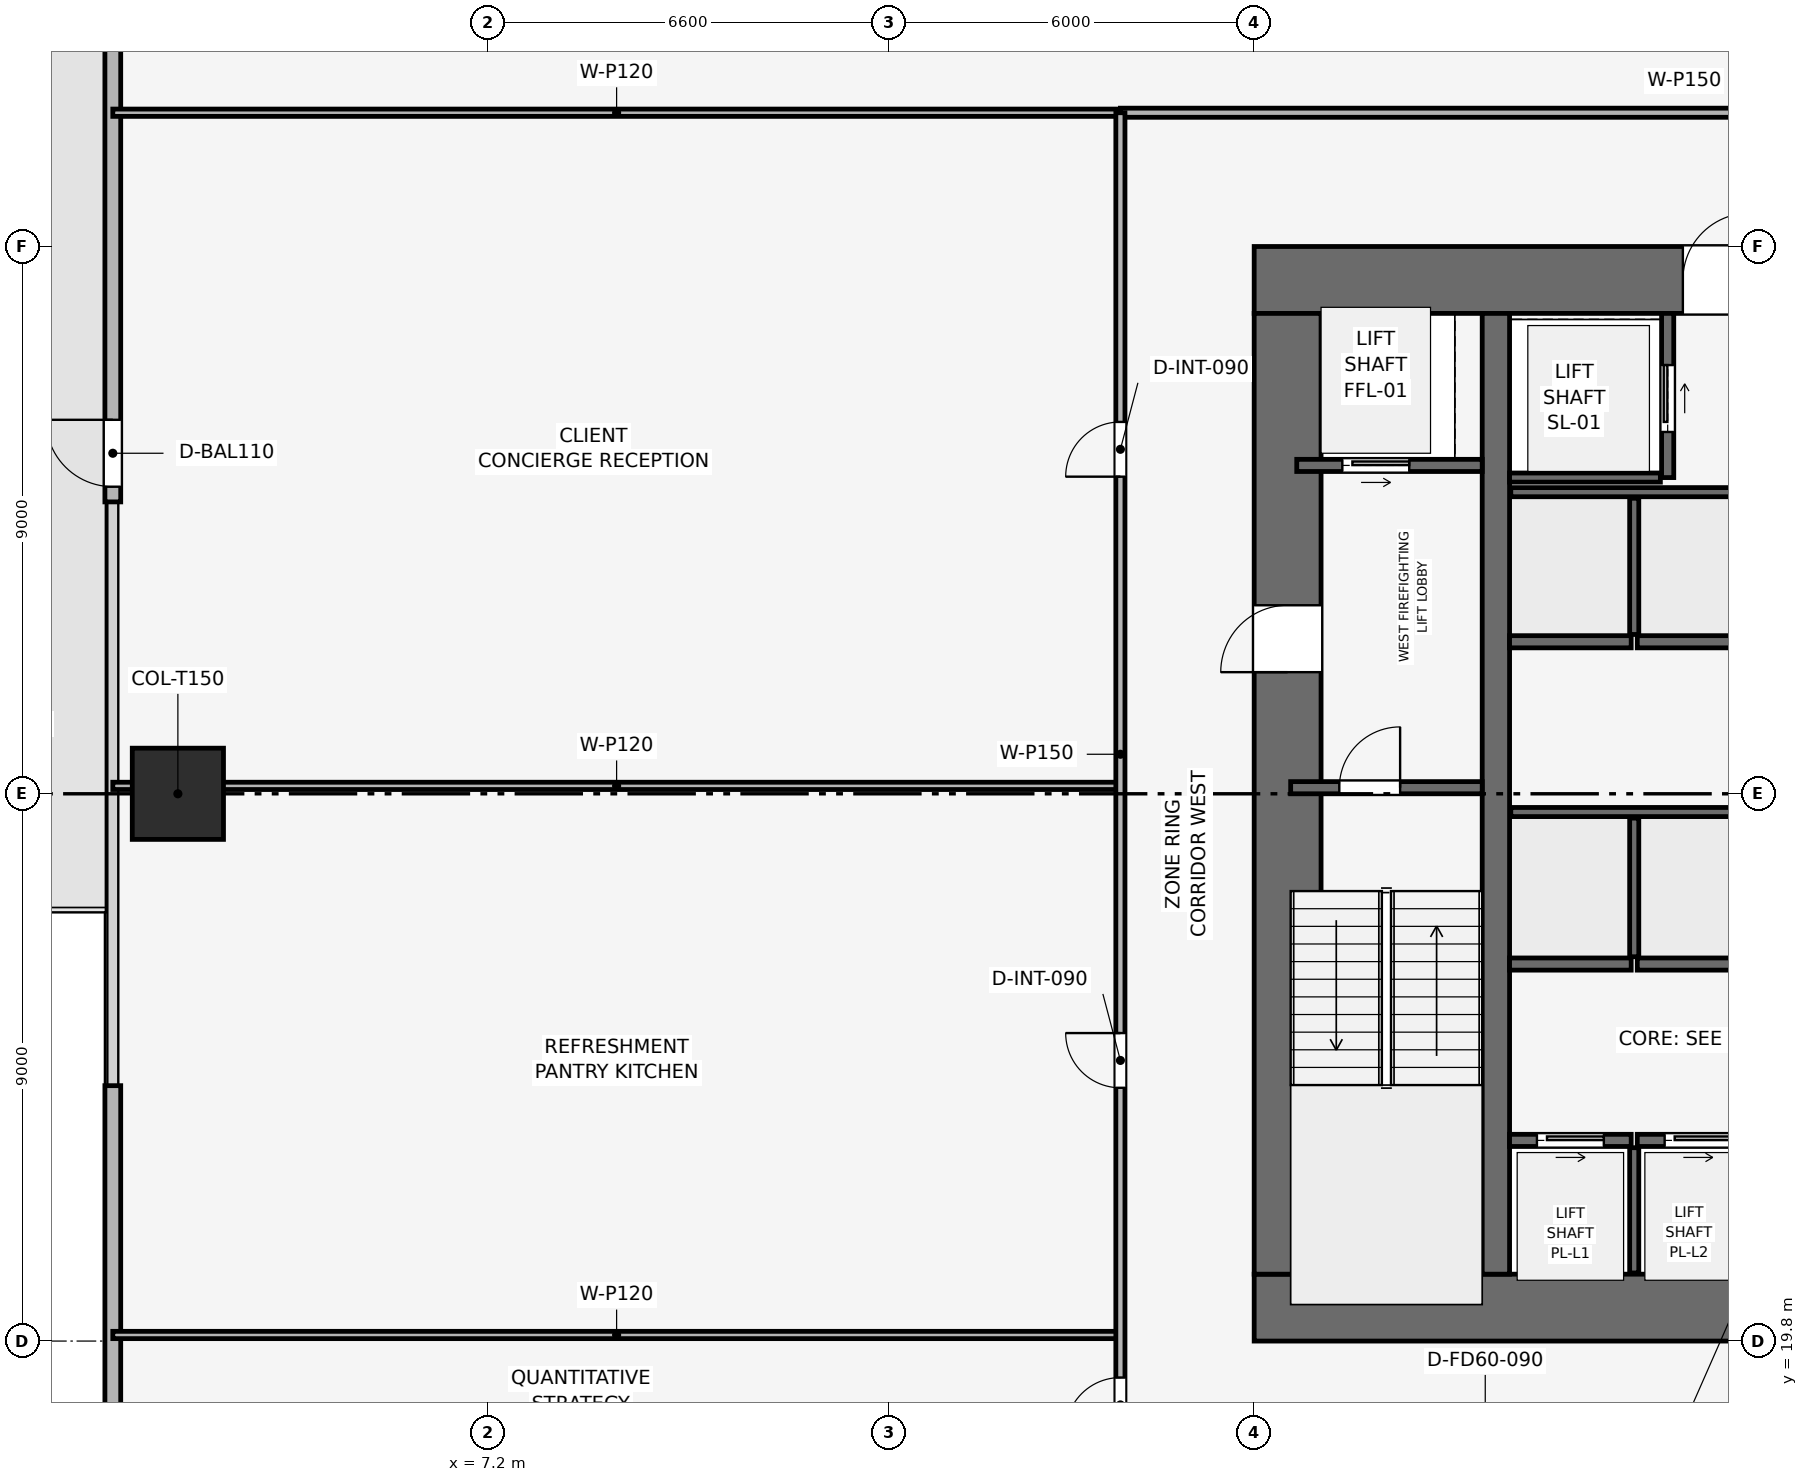
"""IFC4 building model, lengths in metres.
Left out: names, types, materials, properties, quantities, classifications, styles, units other than length and angle.
Written with IfcOpenShell. Run it as: python <this file> out.ifc"""

import sys

from ifc_helpers import new_model, si_unit, direction, frame, frame_2d, origin, origin_2d, place, context, subcontext, project, spatial, rectangle, extrude, element, fill, save


model = new_model("IFC4")
c1 = context("Model", 3, precision=1e-05, world=origin(), true_north=direction((0.0, 1.0)))
c2 = subcontext(c1, "Body", "Model", "MODEL_VIEW")
j1 = project(units=[si_unit("LENGTHUNIT", "METRE"), si_unit("PLANEANGLEUNIT", "RADIAN")], contexts=[c1])
p1 = place(None, origin())
s1 = spatial("IfcSite", under=j1, at=p1, CompositionType="ELEMENT")
p2 = place(p1, origin())
s2 = spatial("IfcBuilding", under=s1, at=p2, CompositionType="ELEMENT")
p3 = place(p2, frame((0.0, 0.0, 65.1)))
s3 = spatial("IfcBuildingStorey", under=s2, at=p3, CompositionType="ELEMENT", Elevation=65.1)
p4 = place(p3, frame((19.8, 20.35, 0.0), z_axis=(0.0, 0.0, 1.0), x_axis=(1.0, 0.0, 0.0)))
e1 = element("IfcWall", 1, at=p4, inside=s3, PredefinedType="SHEAR", context=c2, shape_type="SweptSolid", body=[
    extrude(rectangle(XDim=18.0, YDim=1.1, at=frame_2d((9.0, 0.0))), origin(), (0.0, 0.0, 1.0), 3.9),
])
p5 = place(p4, frame((8.4, 0.0, 0.0)))
e2 = element("IfcOpeningElement", 2, at=p5, cuts=e1, PredefinedType="OPENING", context=c2, shape_type="SweptSolid", body=[
    extrude(rectangle(XDim=1.2, YDim=2.2, at=frame_2d((0.6, 1.1))), frame((0.0, 0.56, 0.0), z_axis=(0.0, -1.0, 0.0), x_axis=(1.0, 0.0, 0.0)), (0.0, 0.0, 1.0), 1.12),
])
p6 = place(p3, frame((19.8, 37.25, 0.0), z_axis=(0.0, 0.0, 1.0), x_axis=(1.0, 0.0, 0.0)))
e3 = element("IfcWall", 3, at=p6, inside=s3, PredefinedType="SHEAR", context=c2, shape_type="SweptSolid", body=[
    extrude(rectangle(XDim=18.0, YDim=1.1, at=frame_2d((9.0, 0.0))), origin(), (0.0, 0.0, 1.0), 3.9),
])
p7 = place(p6, frame((7.05, 0.0, 0.0)))
e4 = element("IfcOpeningElement", 4, at=p7, cuts=e3, PredefinedType="OPENING", context=c2, shape_type="SweptSolid", body=[
    extrude(rectangle(XDim=1.1, YDim=2.15, at=frame_2d((0.55, 1.075))), frame((0.0, 0.56, 0.0), z_axis=(0.0, -1.0, 0.0), x_axis=(1.0, 0.0, 0.0)), (0.0, 0.0, 1.0), 1.12),
])
p8 = place(p3, frame((20.35, 20.9, 0.0), z_axis=(0.0, 0.0, 1.0), x_axis=(0.0, 1.0, 0.0)))
e5 = element("IfcWall", 5, at=p8, inside=s3, PredefinedType="SHEAR", context=c2, shape_type="SweptSolid", body=[
    extrude(rectangle(XDim=15.8, YDim=1.1, at=frame_2d((7.9, 0.0))), origin(), (0.0, 0.0, 1.0), 3.9),
])
p9 = place(p8, frame((9.9, 0.0, 0.0)))
e6 = element("IfcOpeningElement", 6, at=p9, cuts=e5, PredefinedType="OPENING", context=c2, shape_type="SweptSolid", body=[
    extrude(rectangle(XDim=1.1, YDim=2.15, at=frame_2d((0.55, 1.075))), frame((0.0, 0.56, 0.0), z_axis=(0.0, -1.0, 0.0), x_axis=(1.0, 0.0, 0.0)), (0.0, 0.0, 1.0), 1.12),
])
p10 = place(p3, frame((23.775, 20.9, 0.0), z_axis=(0.0, 0.0, 1.0), x_axis=(0.0, 1.0, 0.0)))
e7 = element("IfcWall", 7, at=p10, inside=s3, PredefinedType="SHEAR", context=c2, shape_type="SweptSolid", body=[
    extrude(rectangle(XDim=15.8, YDim=0.45, at=frame_2d((7.9, 0.0))), origin(), (0.0, 0.0, 1.0), 3.9),
])
p11 = place(p3, frame((2.1, 28.8, 0.003), z_axis=(0.0, 0.0, 1.0), x_axis=(1.0, 0.0, 0.0)))
e8 = element("IfcColumn", 8, at=p11, inside=s3, PredefinedType="COLUMN", context=c2, shape_type="SweptSolid", body=[
    extrude(rectangle(XDim=1.5, YDim=1.5, at=origin_2d()), origin(), (0.0, 0.0, 1.0), 3.644),
])
p12 = place(p3, frame((1.03, 8.7, 0.0), z_axis=(0.0, 0.0, 1.0), x_axis=(0.0, 1.0, 0.0)))
e9 = element("IfcWall", 9, at=p12, inside=s3, PredefinedType="SOLIDWALL", context=c2, shape_type="SweptSolid", body=[
    extrude(rectangle(XDim=15.3, YDim=0.26, at=frame_2d((7.65, 0.0))), origin(), (0.0, 0.0, 1.0), 3.65),
])
p13 = place(p12, frame((0.25, 0.0, 0.9)))
e10 = element("IfcOpeningElement", 10, at=p13, cuts=e9, PredefinedType="OPENING", context=c2, shape_type="SweptSolid", body=[
    extrude(rectangle(XDim=3.8, YDim=1.9, at=frame_2d((1.9, 0.95))), frame((0.0, 0.14, 0.0), z_axis=(0.0, -1.0, 0.0), x_axis=(1.0, 0.0, 0.0)), (0.0, 0.0, 1.0), 0.28),
])
p14 = place(p3, frame((1.03, 33.6, 0.0), z_axis=(0.0, 0.0, 1.0), x_axis=(0.0, 1.0, 0.0)))
e11 = element("IfcWall", 11, at=p14, inside=s3, PredefinedType="SOLIDWALL", context=c2, shape_type="SweptSolid", body=[
    extrude(rectangle(XDim=15.3, YDim=0.26, at=frame_2d((7.65, 0.0))), origin(), (0.0, 0.0, 1.0), 3.65),
])
p15 = place(p14, frame((0.25, 0.0, 0.0)))
e12 = element("IfcOpeningElement", 12, at=p15, cuts=e11, PredefinedType="OPENING", context=c2, shape_type="SweptSolid", body=[
    extrude(rectangle(XDim=1.1, YDim=2.2, at=frame_2d((0.55, 1.1))), frame((0.0, 0.14, 0.0), z_axis=(0.0, -1.0, 0.0), x_axis=(1.0, 0.0, 0.0)), (0.0, 0.0, 1.0), 0.28),
])
p16 = place(p3, frame((20.4, 28.9, 0.0), z_axis=(0.0, 0.0, 1.0), x_axis=(1.0, 0.0, 0.0)))
e13 = element("IfcWall", 13, at=p16, inside=s3, PredefinedType="SHEAR", context=c2, shape_type="SweptSolid", body=[
    extrude(rectangle(XDim=3.15, YDim=0.2, at=frame_2d((1.575, 0.0))), origin(), (0.0, 0.0, 1.0), 3.65),
])
p17 = place(p16, frame((0.8, 0.0, 0.0)))
e14 = element("IfcOpeningElement", 14, at=p17, cuts=e13, PredefinedType="OPENING", context=c2, shape_type="SweptSolid", body=[
    extrude(rectangle(XDim=1.0, YDim=2.1, at=frame_2d((0.5, 1.05))), frame((0.0, 0.11, 0.0), z_axis=(0.0, -1.0, 0.0), x_axis=(1.0, 0.0, 0.0)), (0.0, 0.0, 1.0), 0.22),
])
p18 = place(p3, frame((20.5, 34.2, 0.0), z_axis=(0.0, 0.0, 1.0), x_axis=(1.0, 0.0, 0.0)))
e15 = element("IfcWall", 15, at=p18, inside=s3, PredefinedType="SHEAR", context=c2, shape_type="SweptSolid", body=[
    extrude(rectangle(XDim=3.05, YDim=0.2, at=frame_2d((1.525, 0.0))), origin(), (0.0, 0.0, 1.0), 3.65),
])
p19 = place(p18, frame((0.75, 0.0, 0.0)))
e16 = element("IfcOpeningElement", 16, at=p19, cuts=e15, PredefinedType="OPENING", context=c2, shape_type="SweptSolid", body=[
    extrude(rectangle(XDim=1.1, YDim=2.15, at=frame_2d((0.55, 1.075))), frame((0.0, 0.11, 0.0), z_axis=(0.0, -1.0, 0.0), x_axis=(1.0, 0.0, 0.0)), (0.0, 0.0, 1.0), 0.22),
])
p20 = place(p3, frame((26.6, 34.0, 0.0), z_axis=(0.0, 0.0, 1.0), x_axis=(0.0, 1.0, 0.0)))
e17 = element("IfcWall", 17, at=p20, inside=s3, PredefinedType="SHEAR", context=c2, shape_type="SweptSolid", body=[
    extrude(rectangle(XDim=2.7, YDim=0.2, at=frame_2d((1.35, 0.0))), origin(), (0.0, 0.0, 1.0), 3.65),
])
p21 = place(p20, frame((0.75, 0.0, 0.0)))
e18 = element("IfcOpeningElement", 18, at=p21, cuts=e17, PredefinedType="OPENING", context=c2, shape_type="SweptSolid", body=[
    extrude(rectangle(XDim=1.1, YDim=2.15, at=frame_2d((0.55, 1.075))), frame((0.0, 0.11, 0.0), z_axis=(0.0, -1.0, 0.0), x_axis=(1.0, 0.0, 0.0)), (0.0, 0.0, 1.0), 0.22),
])
p22 = place(p3, frame((24.0, 34.0, 0.0), z_axis=(0.0, 0.0, 1.0), x_axis=(1.0, 0.0, 0.0)))
e19 = element("IfcWall", 19, at=p22, inside=s3, PredefinedType="SHEAR", context=c2, shape_type="SweptSolid", body=[
    extrude(rectangle(XDim=2.48, YDim=0.15, at=frame_2d((1.24, 0.0))), origin(), (0.0, 0.0, 1.0), 3.65),
])
p23 = place(p3, frame((24.0, 23.1, 0.0), z_axis=(0.0, 0.0, 1.0), x_axis=(1.0, 0.0, 0.0)))
e20 = element("IfcWall", 20, at=p23, inside=s3, PredefinedType="SHEAR", context=c2, shape_type="SweptSolid", body=[
    extrude(rectangle(XDim=2.0, YDim=0.2, at=frame_2d((1.0, 0.0))), origin(), (0.0, 0.0, 1.0), 3.65),
])
p24 = place(p23, frame((0.45, 0.0, 0.0)))
e21 = element("IfcOpeningElement", 21, at=p24, cuts=e20, PredefinedType="OPENING", context=c2, shape_type="SweptSolid", body=[
    extrude(rectangle(XDim=1.1, YDim=2.15, at=frame_2d((0.55, 1.075))), frame((0.0, 0.11, 0.0), z_axis=(0.0, -1.0, 0.0), x_axis=(1.0, 0.0, 0.0)), (0.0, 0.0, 1.0), 0.22),
])
p25 = place(p3, frame((26.1, 23.1, 0.0), z_axis=(0.0, 0.0, 1.0), x_axis=(1.0, 0.0, 0.0)))
e22 = element("IfcWall", 22, at=p25, inside=s3, PredefinedType="SHEAR", context=c2, shape_type="SweptSolid", body=[
    extrude(rectangle(XDim=2.0, YDim=0.2, at=frame_2d((1.0, 0.0))), origin(), (0.0, 0.0, 1.0), 3.65),
])
p26 = place(p25, frame((0.45, 0.0, 0.0)))
e23 = element("IfcOpeningElement", 23, at=p26, cuts=e22, PredefinedType="OPENING", context=c2, shape_type="SweptSolid", body=[
    extrude(rectangle(XDim=1.1, YDim=2.15, at=frame_2d((0.55, 1.075))), frame((0.0, 0.11, 0.0), z_axis=(0.0, -1.0, 0.0), x_axis=(1.0, 0.0, 0.0)), (0.0, 0.0, 1.0), 0.22),
])
for number, where, z_axis, x_axis in (
    (24, (24.0, 26.0, 0.0), (0.0, 0.0, 1.0), (1.0, 0.0, 0.0)),
    (25, (26.1, 26.0, 0.0), (0.0, 0.0, 1.0), (1.0, 0.0, 0.0)),
    (26, (24.0, 31.3, 0.0), (0.0, 0.0, 1.0), (1.0, 0.0, 0.0)),
    (27, (26.1, 31.3, 0.0), (0.0, 0.0, 1.0), (1.0, 0.0, 0.0)),
):
    element("IfcWall", number, at=place(p3, frame(where, z_axis=z_axis, x_axis=x_axis)), inside=s3, PredefinedType="SHEAR", context=c2, shape_type="SweptSolid", body=[
        extrude(rectangle(XDim=2.0, YDim=0.2, at=frame_2d((1.0, 0.0))), origin(), (0.0, 0.0, 1.0), 3.65),
    ])
p27 = place(p3, frame((26.05, 20.92, 0.0), z_axis=(0.0, 0.0, 1.0), x_axis=(0.0, 1.0, 0.0)))
e28 = element("IfcWall", 28, at=p27, inside=s3, PredefinedType="SHEAR", context=c2, shape_type="SweptSolid", body=[
    extrude(rectangle(XDim=2.06, YDim=0.15, at=frame_2d((1.03, 0.0))), origin(), (0.0, 0.0, 1.0), 3.65),
])
p28 = place(p3, frame((24.02, 28.5, 0.0), z_axis=(0.0, 0.0, 1.0), x_axis=(1.0, 0.0, 0.0)))
e29 = element("IfcWall", 29, at=p28, inside=s3, PredefinedType="SHEAR", context=c2, shape_type="SweptSolid", body=[
    extrude(rectangle(XDim=4.08, YDim=0.15, at=frame_2d((2.04, 0.0))), origin(), (0.0, 0.0, 1.0), 3.65),
])
p29 = place(p3, frame((26.05, 26.12, 0.0), z_axis=(0.0, 0.0, 1.0), x_axis=(0.0, 1.0, 0.0)))
e30 = element("IfcWall", 30, at=p29, inside=s3, PredefinedType="SHEAR", context=c2, shape_type="SweptSolid", body=[
    extrude(rectangle(XDim=2.28, YDim=0.15, at=frame_2d((1.14, 0.0))), origin(), (0.0, 0.0, 1.0), 3.65),
])
p30 = place(p3, frame((24.02, 33.76, 0.0), z_axis=(0.0, 0.0, 1.0), x_axis=(1.0, 0.0, 0.0)))
e31 = element("IfcWall", 31, at=p30, inside=s3, PredefinedType="SHEAR", context=c2, shape_type="SweptSolid", body=[
    extrude(rectangle(XDim=4.08, YDim=0.15, at=frame_2d((2.04, 0.0))), origin(), (0.0, 0.0, 1.0), 3.65),
])
p31 = place(p3, frame((26.05, 31.42, 0.0), z_axis=(0.0, 0.0, 1.0), x_axis=(0.0, 1.0, 0.0)))
e32 = element("IfcWall", 32, at=p31, inside=s3, PredefinedType="SHEAR", context=c2, shape_type="SweptSolid", body=[
    extrude(rectangle(XDim=2.24, YDim=0.15, at=frame_2d((1.12, 0.0))), origin(), (0.0, 0.0, 1.0), 3.65),
])
for number, where, z_axis, x_axis in (
    (33, (1.03, 40.0, 0.0), (0.0, 0.0, 1.0), (1.0, 0.0, 0.0)),
    (34, (1.03, 19.9, 0.0), (0.0, 0.0, 1.0), (1.0, 0.0, 0.0)),
):
    element("IfcWall", number, at=place(p3, frame(where, z_axis=z_axis, x_axis=x_axis)), inside=s3, PredefinedType="PARTITIONING", context=c2, shape_type="SweptSolid", body=[
        extrude(rectangle(XDim=16.57, YDim=0.12, at=frame_2d((8.285, 0.0))), origin(), (0.0, 0.0, 1.0), 2.935),
    ])
p32 = place(p3, frame((1.03, 28.93, 0.0), z_axis=(0.0, 0.0, 1.0), x_axis=(1.0, 0.0, 0.0)))
e35 = element("IfcWall", 35, at=p32, inside=s3, PredefinedType="PARTITIONING", context=c2, shape_type="SweptSolid", body=[
    extrude(rectangle(XDim=16.57, YDim=0.12, at=frame_2d((8.285, 0.0))), origin(), (0.0, 0.0, 1.0), 3.085),
])
p33 = place(p3, frame((17.6, 40.0, 0.0), z_axis=(0.0, 0.0, 1.0), x_axis=(1.0, 0.0, 0.0)))
e36 = element("IfcWall", 36, at=p33, inside=s3, PredefinedType="PARTITIONING", context=c2, shape_type="SweptSolid", body=[
    extrude(rectangle(XDim=22.4, YDim=0.15, at=frame_2d((11.2, 0.0))), origin(), (0.0, 0.0, 1.0), 3.085),
])
p34 = place(p33, frame((10.75, 0.0, 0.0)))
e37 = element("IfcOpeningElement", 37, at=p34, cuts=e36, PredefinedType="OPENING", context=c2, shape_type="SweptSolid", body=[
    extrude(rectangle(XDim=0.9, YDim=2.1, at=frame_2d((0.45, 1.05))), frame((0.0, 0.085, 0.0), z_axis=(0.0, -1.0, 0.0), x_axis=(1.0, 0.0, 0.0)), (0.0, 0.0, 1.0), 0.17),
])
p35 = place(p3, frame((17.6, 17.6, 0.0), z_axis=(0.0, 0.0, 1.0), x_axis=(0.0, 1.0, 0.0)))
e38 = element("IfcWall", 38, at=p35, inside=s3, PredefinedType="PARTITIONING", context=c2, shape_type="SweptSolid", body=[
    extrude(rectangle(XDim=22.4, YDim=0.15, at=frame_2d((11.2, 0.0))), origin(), (0.0, 0.0, 1.0), 3.085),
])
p36 = place(p35, frame((0.7, 0.0, 0.0)))
e39 = element("IfcOpeningElement", 39, at=p36, cuts=e38, PredefinedType="OPENING", context=c2, shape_type="SweptSolid", body=[
    extrude(rectangle(XDim=0.9, YDim=2.1, at=frame_2d((0.45, 1.05))), frame((0.0, 0.085, 0.0), z_axis=(0.0, -1.0, 0.0), x_axis=(1.0, 0.0, 0.0)), (0.0, 0.0, 1.0), 0.17),
])
p37 = place(p35, frame((6.365, 0.0, 0.0)))
e40 = element("IfcOpeningElement", 40, at=p37, cuts=e38, PredefinedType="OPENING", context=c2, shape_type="SweptSolid", body=[
    extrude(rectangle(XDim=0.9, YDim=2.1, at=frame_2d((0.45, 1.05))), frame((0.0, 0.085, 0.0), z_axis=(0.0, -1.0, 0.0), x_axis=(1.0, 0.0, 0.0)), (0.0, 0.0, 1.0), 0.17),
])
p38 = place(p35, frame((16.415, 0.0, 0.0)))
e41 = element("IfcOpeningElement", 41, at=p38, cuts=e38, PredefinedType="OPENING", context=c2, shape_type="SweptSolid", body=[
    extrude(rectangle(XDim=0.9, YDim=2.1, at=frame_2d((0.45, 1.05))), frame((0.0, 0.085, 0.0), z_axis=(0.0, -1.0, 0.0), x_axis=(1.0, 0.0, 0.0)), (0.0, 0.0, 1.0), 0.17),
])
p39 = place(p15, origin())
e42 = element("IfcDoor", 42, at=p39, inside=s3, OperationType="SINGLE_SWING_RIGHT", PredefinedType="DOOR", context=c2, shape_type="SweptSolid", body=[
    extrude(rectangle(XDim=1.1, YDim=2.2, at=frame_2d((0.55, 1.1))), frame((0.0, 0.025, 0.0), z_axis=(0.0, -1.0, 0.0), x_axis=(1.0, 0.0, 0.0)), (0.0, 0.0, 1.0), 0.05),
])
fill(e12, e42)
p40 = place(p17, origin())
e43 = element("IfcDoor", 43, at=p40, inside=s3, OperationType="SINGLE_SWING_RIGHT", PredefinedType="DOOR", context=c2, shape_type="SweptSolid", body=[
    extrude(rectangle(XDim=1.0, YDim=2.1, at=frame_2d((0.5, 1.05))), frame((0.0, 0.025, 0.0), z_axis=(0.0, -1.0, 0.0), x_axis=(1.0, 0.0, 0.0)), (0.0, 0.0, 1.0), 0.05),
])
fill(e14, e43)
p41 = place(p19, origin())
e44 = element("IfcDoor", 44, at=p41, inside=s3, OperationType="SLIDING_TO_RIGHT", PredefinedType="DOOR", context=c2, shape_type="SweptSolid", body=[
    extrude(rectangle(XDim=1.1, YDim=2.15, at=frame_2d((0.55, 1.075))), frame((0.0, 0.025, 0.0), z_axis=(0.0, -1.0, 0.0), x_axis=(1.0, 0.0, 0.0)), (0.0, 0.0, 1.0), 0.05),
])
fill(e16, e44)
p42 = place(p21, origin())
e45 = element("IfcDoor", 45, at=p42, inside=s3, OperationType="SLIDING_TO_RIGHT", PredefinedType="DOOR", context=c2, shape_type="SweptSolid", body=[
    extrude(rectangle(XDim=1.1, YDim=2.15, at=frame_2d((0.55, 1.075))), frame((0.0, 0.025, 0.0), z_axis=(0.0, -1.0, 0.0), x_axis=(1.0, 0.0, 0.0)), (0.0, 0.0, 1.0), 0.05),
])
fill(e18, e45)
p43 = place(p24, origin())
e46 = element("IfcDoor", 46, at=p43, inside=s3, OperationType="SLIDING_TO_RIGHT", PredefinedType="DOOR", context=c2, shape_type="SweptSolid", body=[
    extrude(rectangle(XDim=1.1, YDim=2.15, at=frame_2d((0.55, 1.075))), frame((0.0, 0.025, 0.0), z_axis=(0.0, -1.0, 0.0), x_axis=(1.0, 0.0, 0.0)), (0.0, 0.0, 1.0), 0.05),
])
fill(e21, e46)
p44 = place(p26, origin())
e47 = element("IfcDoor", 47, at=p44, inside=s3, OperationType="SLIDING_TO_RIGHT", PredefinedType="DOOR", context=c2, shape_type="SweptSolid", body=[
    extrude(rectangle(XDim=1.1, YDim=2.15, at=frame_2d((0.55, 1.075))), frame((0.0, 0.025, 0.0), z_axis=(0.0, -1.0, 0.0), x_axis=(1.0, 0.0, 0.0)), (0.0, 0.0, 1.0), 0.05),
])
fill(e23, e47)
p45 = place(p36, origin())
e48 = element("IfcDoor", 48, at=p45, inside=s3, OperationType="SINGLE_SWING_LEFT", PredefinedType="DOOR", context=c2, shape_type="SweptSolid", body=[
    extrude(rectangle(XDim=0.9, YDim=2.1, at=frame_2d((0.45, 1.05))), frame((0.0, 0.025, 0.0), z_axis=(0.0, -1.0, 0.0), x_axis=(1.0, 0.0, 0.0)), (0.0, 0.0, 1.0), 0.05),
])
fill(e39, e48)
p46 = place(p37, origin())
e49 = element("IfcDoor", 49, at=p46, inside=s3, OperationType="SINGLE_SWING_RIGHT", PredefinedType="DOOR", context=c2, shape_type="SweptSolid", body=[
    extrude(rectangle(XDim=0.9, YDim=2.1, at=frame_2d((0.45, 1.05))), frame((0.0, 0.025, 0.0), z_axis=(0.0, -1.0, 0.0), x_axis=(1.0, 0.0, 0.0)), (0.0, 0.0, 1.0), 0.05),
])
fill(e40, e49)
p47 = place(p38, origin())
e50 = element("IfcDoor", 50, at=p47, inside=s3, OperationType="SINGLE_SWING_LEFT", PredefinedType="DOOR", context=c2, shape_type="SweptSolid", body=[
    extrude(rectangle(XDim=0.9, YDim=2.1, at=frame_2d((0.45, 1.05))), frame((0.0, 0.025, 0.0), z_axis=(0.0, -1.0, 0.0), x_axis=(1.0, 0.0, 0.0)), (0.0, 0.0, 1.0), 0.05),
])
fill(e41, e50)
p48 = place(p9, origin())
e51 = element("IfcDoor", 51, at=p48, inside=s3, OperationType="SINGLE_SWING_LEFT", PredefinedType="DOOR", context=c2, shape_type="SweptSolid", body=[
    extrude(rectangle(XDim=1.1, YDim=2.15, at=frame_2d((0.55, 1.075))), frame((0.0, 0.025, 0.0), z_axis=(0.0, -1.0, 0.0), x_axis=(1.0, 0.0, 0.0)), (0.0, 0.0, 1.0), 0.05),
])
fill(e6, e51)
p49 = place(p7, origin())
e52 = element("IfcDoor", 52, at=p49, inside=s3, OperationType="SINGLE_SWING_RIGHT", PredefinedType="DOOR", context=c2, shape_type="SweptSolid", body=[
    extrude(rectangle(XDim=1.1, YDim=2.15, at=frame_2d((0.55, 1.075))), frame((0.0, 0.025, 0.0), z_axis=(0.0, -1.0, 0.0), x_axis=(1.0, 0.0, 0.0)), (0.0, 0.0, 1.0), 0.05),
])
fill(e4, e52)
save(model, sys.argv[1])
